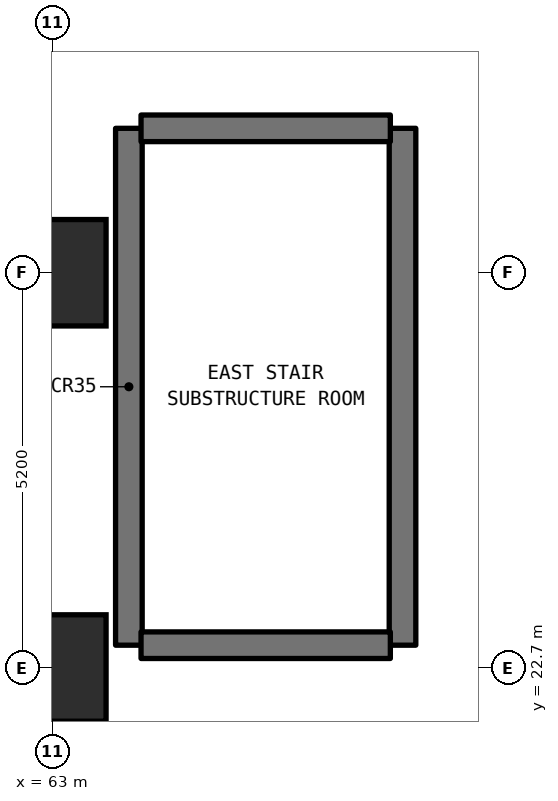
"""IFC4 building model, lengths in metres.
Left out: names, types, materials, properties, quantities, classifications, styles, units other than length and angle.
Written with IfcOpenShell. Run it as: python <this file> out.ifc"""

import sys

from ifc_helpers import new_model, si_unit, direction, frame, frame_2d, origin, origin_2d, place, context, subcontext, project, spatial, rectangle, extrude, element, save


model = new_model("IFC4")
c1 = context("Model", 3, precision=1e-05, world=origin(), true_north=direction((0.0, 1.0)))
c2 = subcontext(c1, "Body", "Model", "MODEL_VIEW")
j1 = project(units=[si_unit("LENGTHUNIT", "METRE"), si_unit("PLANEANGLEUNIT", "RADIAN")], contexts=[c1])
p1 = place(None, origin())
s1 = spatial("IfcSite", under=j1, at=p1, CompositionType="ELEMENT")
p2 = place(p1, origin())
s2 = spatial("IfcBuilding", under=s1, at=p2, CompositionType="ELEMENT")
p3 = place(p2, frame((0.0, 0.0, -4.5)))
s3 = spatial("IfcBuildingStorey", under=s2, at=p3, CompositionType="ELEMENT", Elevation=-4.5)
for number, where, z_axis, x_axis in (
    (1, (63.0, 22.7, 0.0), (0.0, 0.0, 1.0), (1.0, 0.0, 0.0)),
    (2, (63.0, 27.9, 0.0), (0.0, 0.0, 1.0), (1.0, 0.0, 0.0)),
):
    element("IfcColumn", number, at=place(p3, frame(where, z_axis=z_axis, x_axis=x_axis)), inside=s3, PredefinedType="PILASTER", context=c2, shape_type="SweptSolid", body=[
        extrude(rectangle(XDim=1.4, YDim=1.4, at=origin_2d()), origin(), (0.0, 0.0, 1.0), 4.5),
    ])
for number, where, z_axis, x_axis in (
    (3, (64.0, 23.0, 0.0), (0.0, 0.0, 1.0), (0.0, 1.0, 0.0)),
    (4, (67.6, 23.0, 0.0), (0.0, 0.0, 1.0), (0.0, 1.0, 0.0)),
):
    element("IfcWall", number, at=place(p3, frame(where, z_axis=z_axis, x_axis=x_axis)), inside=s3, PredefinedType="SHEAR", context=c2, shape_type="SweptSolid", body=[
        extrude(rectangle(XDim=6.8, YDim=0.35, at=frame_2d((3.4, 0.0))), origin(), (0.0, 0.0, 1.0), 4.1),
    ])
for number, where, z_axis, x_axis in (
    (5, (64.16, 23.0, 0.0), (0.0, 0.0, 1.0), (1.0, 0.0, 0.0)),
    (6, (64.16, 29.8, 0.0), (0.0, 0.0, 1.0), (1.0, 0.0, 0.0)),
):
    element("IfcWall", number, at=place(p3, frame(where, z_axis=z_axis, x_axis=x_axis)), inside=s3, PredefinedType="SHEAR", context=c2, shape_type="SweptSolid", body=[
        extrude(rectangle(XDim=3.28, YDim=0.35, at=frame_2d((1.64, 0.0))), origin(), (0.0, 0.0, 1.0), 4.1),
    ])
save(model, sys.argv[1])
